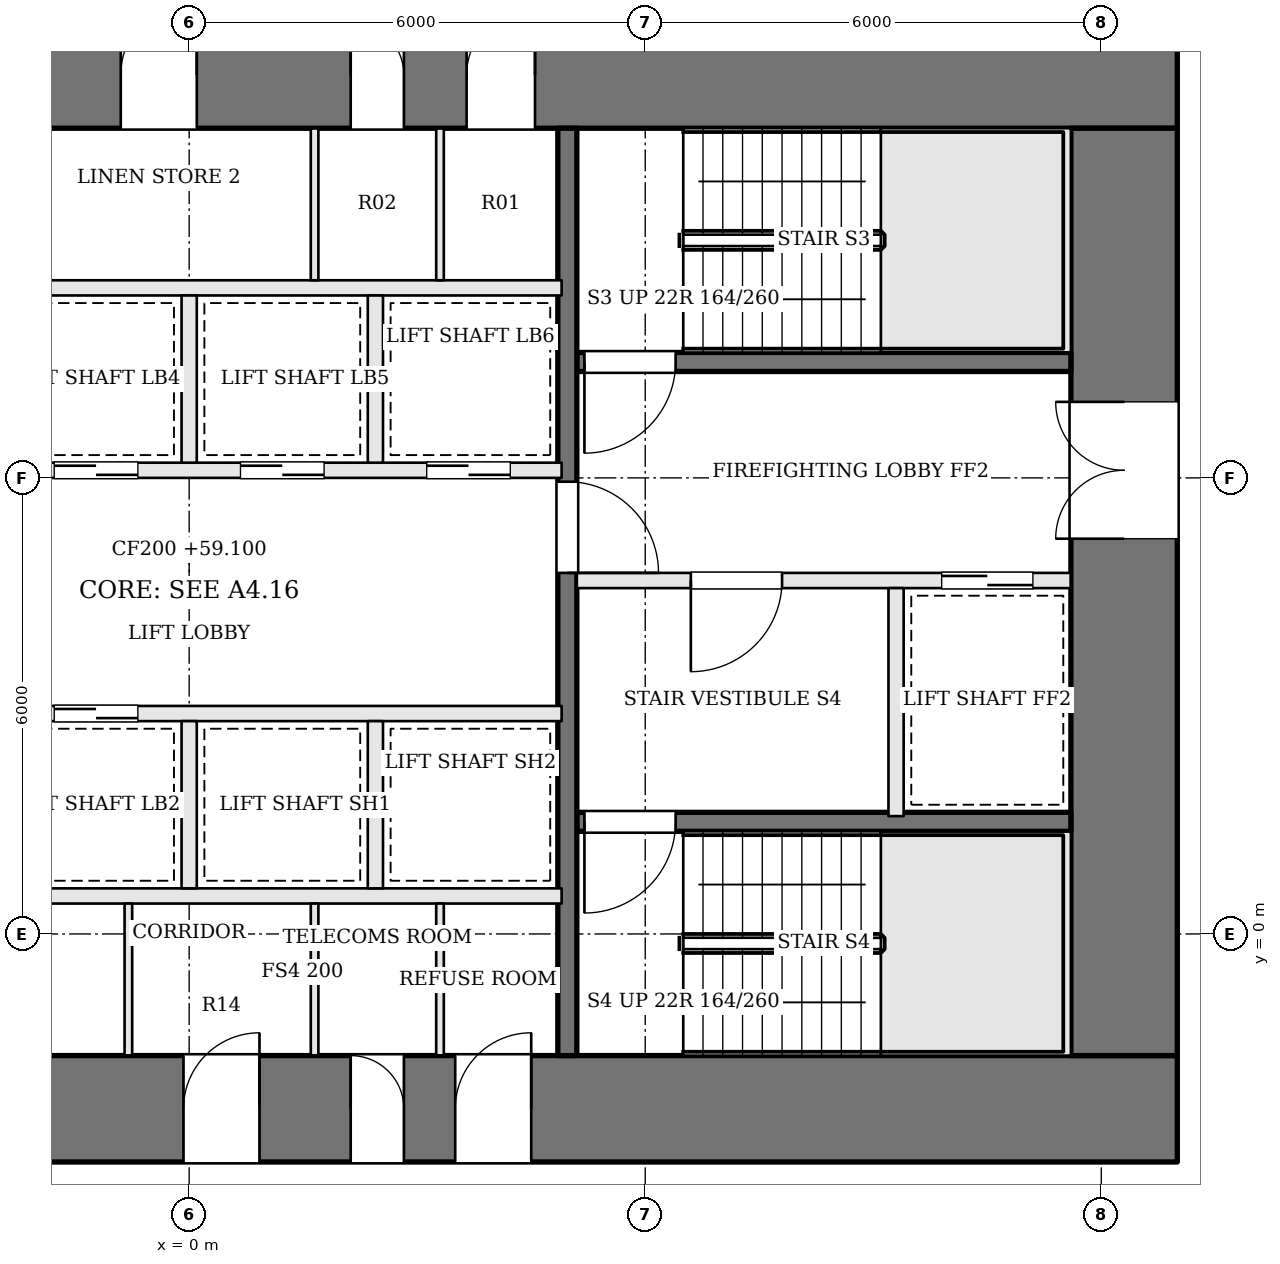
"""IFC4 building model, lengths in metres.
Left out: names, types, materials, properties, quantities, classifications, styles, units other than length and angle.
Written with IfcOpenShell. Run it as: python <this file> out.ifc"""

import sys

from ifc_helpers import new_model, si_unit, direction, frame, frame_2d, origin, place, context, subcontext, project, spatial, rectangle, extrude, element, fill, save


model = new_model("IFC4")
c1 = context("Model", 3, precision=1e-05, world=origin(), true_north=direction((0.0, 1.0)))
c2 = subcontext(c1, "Body", "Model", "MODEL_VIEW")
j1 = project(units=[si_unit("LENGTHUNIT", "METRE"), si_unit("PLANEANGLEUNIT", "RADIAN")], contexts=[c1])
p1 = place(None, origin())
s1 = spatial("IfcSite", under=j1, at=p1, CompositionType="ELEMENT")
p2 = place(p1, origin())
s2 = spatial("IfcBuilding", under=s1, at=p2, CompositionType="ELEMENT")
p3 = place(p2, frame((0.0, 0.0, 59.1)))
s3 = spatial("IfcBuildingStorey", under=s2, at=p3, CompositionType="ELEMENT", Elevation=59.1)
p4 = place(p3, frame((-13.0, 11.3, 0.0), z_axis=(0.0, 0.0, 1.0), x_axis=(1.0, 0.0, 0.0)))
e1 = element("IfcWall", 1, at=p4, inside=s3, PredefinedType="SHEAR", context=c2, shape_type="SweptSolid", body=[
    extrude(rectangle(XDim=26.0, YDim=1.4, at=frame_2d((13.0, 0.0))), origin(), (0.0, 0.0, 1.0), 3.6),
])
p5 = place(p4, frame((8.825, 0.0, 0.0)))
e2 = element("IfcOpeningElement", 2, at=p5, cuts=e1, PredefinedType="OPENING", context=c2, shape_type="SweptSolid", body=[
    extrude(rectangle(XDim=1.0, YDim=2.1, at=frame_2d((0.5, 1.05))), frame((0.0, 0.71, 0.0), z_axis=(0.0, -1.0, 0.0), x_axis=(1.0, 0.0, 0.0)), (0.0, 0.0, 1.0), 1.42),
])
p6 = place(p4, frame((12.1, 0.0, 0.0)))
e3 = element("IfcOpeningElement", 3, at=p6, cuts=e1, PredefinedType="OPENING", context=c2, shape_type="SweptSolid", body=[
    extrude(rectangle(XDim=1.0, YDim=2.1, at=frame_2d((0.5, 1.05))), frame((0.0, 0.71, 0.0), z_axis=(0.0, -1.0, 0.0), x_axis=(1.0, 0.0, 0.0)), (0.0, 0.0, 1.0), 1.42),
])
p7 = place(p4, frame((15.125, 0.0, 0.0)))
e4 = element("IfcOpeningElement", 4, at=p7, cuts=e1, PredefinedType="OPENING", context=c2, shape_type="SweptSolid", body=[
    extrude(rectangle(XDim=0.7, YDim=2.1, at=frame_2d((0.35, 1.05))), frame((0.0, 0.71, 0.0), z_axis=(0.0, -1.0, 0.0), x_axis=(1.0, 0.0, 0.0)), (0.0, 0.0, 1.0), 1.42),
])
p8 = place(p4, frame((16.65, 0.0, 0.0)))
e5 = element("IfcOpeningElement", 5, at=p8, cuts=e1, PredefinedType="OPENING", context=c2, shape_type="SweptSolid", body=[
    extrude(rectangle(XDim=0.9, YDim=2.1, at=frame_2d((0.45, 1.05))), frame((0.0, 0.71, 0.0), z_axis=(0.0, -1.0, 0.0), x_axis=(1.0, 0.0, 0.0)), (0.0, 0.0, 1.0), 1.42),
])
p9 = place(p3, frame((-13.0, -2.3, 0.0), z_axis=(0.0, 0.0, 1.0), x_axis=(1.0, 0.0, 0.0)))
e6 = element("IfcWall", 6, at=p9, inside=s3, PredefinedType="SHEAR", context=c2, shape_type="SweptSolid", body=[
    extrude(rectangle(XDim=26.0, YDim=1.4, at=frame_2d((13.0, 0.0))), origin(), (0.0, 0.0, 1.0), 3.6),
])
p10 = place(p9, frame((9.65, 0.0, 0.0)))
e7 = element("IfcOpeningElement", 7, at=p10, cuts=e6, PredefinedType="OPENING", context=c2, shape_type="SweptSolid", body=[
    extrude(rectangle(XDim=1.0, YDim=2.1, at=frame_2d((0.5, 1.05))), frame((0.0, 0.71, 0.0), z_axis=(0.0, -1.0, 0.0), x_axis=(1.0, 0.0, 0.0)), (0.0, 0.0, 1.0), 1.42),
])
p11 = place(p9, frame((12.925, 0.0, 0.0)))
e8 = element("IfcOpeningElement", 8, at=p11, cuts=e6, PredefinedType="OPENING", context=c2, shape_type="SweptSolid", body=[
    extrude(rectangle(XDim=1.0, YDim=2.1, at=frame_2d((0.5, 1.05))), frame((0.0, 0.71, 0.0), z_axis=(0.0, -1.0, 0.0), x_axis=(1.0, 0.0, 0.0)), (0.0, 0.0, 1.0), 1.42),
])
p12 = place(p9, frame((15.125, 0.0, 0.0)))
e9 = element("IfcOpeningElement", 9, at=p12, cuts=e6, PredefinedType="OPENING", context=c2, shape_type="SweptSolid", body=[
    extrude(rectangle(XDim=0.7, YDim=2.1, at=frame_2d((0.35, 1.05))), frame((0.0, 0.71, 0.0), z_axis=(0.0, -1.0, 0.0), x_axis=(1.0, 0.0, 0.0)), (0.0, 0.0, 1.0), 1.42),
])
p13 = place(p9, frame((16.5, 0.0, 0.0)))
e10 = element("IfcOpeningElement", 10, at=p13, cuts=e6, PredefinedType="OPENING", context=c2, shape_type="SweptSolid", body=[
    extrude(rectangle(XDim=1.0, YDim=2.1, at=frame_2d((0.5, 1.05))), frame((0.0, 0.71, 0.0), z_axis=(0.0, -1.0, 0.0), x_axis=(1.0, 0.0, 0.0)), (0.0, 0.0, 1.0), 1.42),
])
p14 = place(p3, frame((12.3, -1.6, 0.0), z_axis=(0.0, 0.0, 1.0), x_axis=(0.0, 1.0, 0.0)))
e11 = element("IfcWall", 11, at=p14, inside=s3, PredefinedType="SHEAR", context=c2, shape_type="SweptSolid", body=[
    extrude(rectangle(XDim=12.2, YDim=1.4, at=frame_2d((6.1, 0.0))), origin(), (0.0, 0.0, 1.0), 3.6),
])
p15 = place(p14, frame((6.8, 0.0, 0.0)))
e12 = element("IfcOpeningElement", 12, at=p15, cuts=e11, PredefinedType="OPENING", context=c2, shape_type="SweptSolid", body=[
    extrude(rectangle(XDim=1.8, YDim=2.1, at=frame_2d((0.9, 1.05))), frame((0.0, 0.71, 0.0), z_axis=(0.0, -1.0, 0.0), x_axis=(1.0, 0.0, 0.0)), (0.0, 0.0, 1.0), 1.42),
])
p16 = place(p3, frame((11.6, 7.525, 0.0), z_axis=(0.0, 0.0, 1.0), x_axis=(-1.0, 0.0, 0.0)))
e13 = element("IfcWall", 13, at=p16, inside=s3, PredefinedType="SOLIDWALL", context=c2, shape_type="SweptSolid", body=[
    extrude(rectangle(XDim=6.5, YDim=0.25, at=frame_2d((3.25, 0.0))), origin(), (0.0, 0.0, 1.0), 3.4),
])
p17 = place(p16, frame((5.2, 0.0, 0.0)))
e14 = element("IfcOpeningElement", 14, at=p17, cuts=e13, PredefinedType="OPENING", context=c2, shape_type="SweptSolid", body=[
    extrude(rectangle(XDim=1.2, YDim=2.1, at=frame_2d((0.6, 1.05))), frame((0.0, 0.135, 0.0), z_axis=(0.0, -1.0, 0.0), x_axis=(1.0, 0.0, 0.0)), (0.0, 0.0, 1.0), 0.27),
])
p18 = place(p3, frame((11.6, 4.65, 0.0), z_axis=(0.0, 0.0, 1.0), x_axis=(-1.0, 0.0, 0.0)))
e15 = element("IfcWall", 15, at=p18, inside=s3, PredefinedType="SOLIDWALL", context=c2, shape_type="SweptSolid", body=[
    extrude(rectangle(XDim=6.5, YDim=0.2, at=frame_2d((3.25, 0.0))), origin(), (0.0, 0.0, 1.0), 3.4),
])
p19 = place(p18, frame((3.8, 0.0, 0.0)))
e16 = element("IfcOpeningElement", 16, at=p19, cuts=e15, PredefinedType="OPENING", context=c2, shape_type="SweptSolid", body=[
    extrude(rectangle(XDim=1.2, YDim=2.1, at=frame_2d((0.6, 1.05))), frame((0.0, 0.11, 0.0), z_axis=(0.0, -1.0, 0.0), x_axis=(1.0, 0.0, 0.0)), (0.0, 0.0, 1.0), 0.22),
])
p20 = place(p18, frame((0.5, 0.0, 0.0)))
e17 = element("IfcOpeningElement", 17, at=p20, cuts=e15, PredefinedType="OPENING", context=c2, shape_type="SweptSolid", body=[
    extrude(rectangle(XDim=1.2, YDim=2.1, at=frame_2d((0.6, 1.05))), frame((0.0, 0.11, 0.0), z_axis=(0.0, -1.0, 0.0), x_axis=(1.0, 0.0, 0.0)), (0.0, 0.0, 1.0), 0.22),
])
p21 = place(p3, frame((11.6, 1.475, 0.0), z_axis=(0.0, 0.0, 1.0), x_axis=(-1.0, 0.0, 0.0)))
e18 = element("IfcWall", 18, at=p21, inside=s3, PredefinedType="SOLIDWALL", context=c2, shape_type="SweptSolid", body=[
    extrude(rectangle(XDim=6.5, YDim=0.25, at=frame_2d((3.25, 0.0))), origin(), (0.0, 0.0, 1.0), 3.4),
])
p22 = place(p21, frame((5.2, 0.0, 0.0)))
e19 = element("IfcOpeningElement", 19, at=p22, cuts=e18, PredefinedType="OPENING", context=c2, shape_type="SweptSolid", body=[
    extrude(rectangle(XDim=1.2, YDim=2.1, at=frame_2d((0.6, 1.05))), frame((0.0, 0.135, 0.0), z_axis=(0.0, -1.0, 0.0), x_axis=(1.0, 0.0, 0.0)), (0.0, 0.0, 1.0), 0.27),
])
p23 = place(p3, frame((9.3, 4.55, 0.0), z_axis=(0.0, 0.0, 1.0), x_axis=(0.0, -1.0, 0.0)))
e20 = element("IfcWall", 20, at=p23, inside=s3, PredefinedType="SOLIDWALL", context=c2, shape_type="SweptSolid", body=[
    extrude(rectangle(XDim=3.0, YDim=0.2, at=frame_2d((1.5, 0.0))), origin(), (0.0, 0.0, 1.0), 3.4),
])
p24 = place(p3, frame((4.975, 10.6, 0.0), z_axis=(0.0, 0.0, 1.0), x_axis=(0.0, -1.0, 0.0)))
e21 = element("IfcWall", 21, at=p24, inside=s3, PredefinedType="SOLIDWALL", context=c2, shape_type="SweptSolid", body=[
    extrude(rectangle(XDim=12.2, YDim=0.25, at=frame_2d((6.1, 0.0))), origin(), (0.0, 0.0, 1.0), 3.4),
])
p25 = place(p24, frame((4.65, 0.0, 0.0)))
e22 = element("IfcOpeningElement", 22, at=p25, cuts=e21, PredefinedType="OPENING", context=c2, shape_type="SweptSolid", body=[
    extrude(rectangle(XDim=1.2, YDim=2.1, at=frame_2d((0.6, 1.05))), frame((0.0, 0.135, 0.0), z_axis=(0.0, -1.0, 0.0), x_axis=(1.0, 0.0, 0.0)), (0.0, 0.0, 1.0), 0.27),
])
p26 = place(p3, frame((-4.9, 0.5, 0.0), z_axis=(0.0, 0.0, 1.0), x_axis=(1.0, 0.0, 0.0)))
e23 = element("IfcWall", 23, at=p26, inside=s3, PredefinedType="SOLIDWALL", context=c2, shape_type="SweptSolid", body=[
    extrude(rectangle(XDim=9.8, YDim=0.2, at=frame_2d((4.9, 0.0))), origin(), (0.0, 0.0, 1.0), 3.4),
])
p27 = place(p3, frame((-4.9, 2.9, 0.0), z_axis=(0.0, 0.0, 1.0), x_axis=(1.0, 0.0, 0.0)))
e24 = element("IfcWall", 24, at=p27, inside=s3, PredefinedType="SOLIDWALL", context=c2, shape_type="SweptSolid", body=[
    extrude(rectangle(XDim=9.8, YDim=0.2, at=frame_2d((4.9, 0.0))), origin(), (0.0, 0.0, 1.0), 3.4),
])
p28 = place(p27, frame((0.675, 0.0, 0.0)))
e25 = element("IfcOpeningElement", 25, at=p28, cuts=e24, PredefinedType="OPENING", context=c2, shape_type="SweptSolid", body=[
    extrude(rectangle(XDim=1.1, YDim=2.1, at=frame_2d((0.55, 1.05))), frame((0.0, 0.11, 0.0), z_axis=(0.0, -1.0, 0.0), x_axis=(1.0, 0.0, 0.0)), (0.0, 0.0, 1.0), 0.22),
])
p29 = place(p27, frame((3.125, 0.0, 0.0)))
e26 = element("IfcOpeningElement", 26, at=p29, cuts=e24, PredefinedType="OPENING", context=c2, shape_type="SweptSolid", body=[
    extrude(rectangle(XDim=1.1, YDim=2.1, at=frame_2d((0.55, 1.05))), frame((0.0, 0.11, 0.0), z_axis=(0.0, -1.0, 0.0), x_axis=(1.0, 0.0, 0.0)), (0.0, 0.0, 1.0), 0.22),
])
p30 = place(p3, frame((-4.9, 6.1, 0.0), z_axis=(0.0, 0.0, 1.0), x_axis=(1.0, 0.0, 0.0)))
e27 = element("IfcWall", 27, at=p30, inside=s3, PredefinedType="SOLIDWALL", context=c2, shape_type="SweptSolid", body=[
    extrude(rectangle(XDim=9.8, YDim=0.2, at=frame_2d((4.9, 0.0))), origin(), (0.0, 0.0, 1.0), 3.4),
])
p31 = place(p30, frame((0.675, 0.0, 0.0)))
e28 = element("IfcOpeningElement", 28, at=p31, cuts=e27, PredefinedType="OPENING", context=c2, shape_type="SweptSolid", body=[
    extrude(rectangle(XDim=1.1, YDim=2.1, at=frame_2d((0.55, 1.05))), frame((0.0, 0.11, 0.0), z_axis=(0.0, -1.0, 0.0), x_axis=(1.0, 0.0, 0.0)), (0.0, 0.0, 1.0), 0.22),
])
p32 = place(p30, frame((3.125, 0.0, 0.0)))
e29 = element("IfcOpeningElement", 29, at=p32, cuts=e27, PredefinedType="OPENING", context=c2, shape_type="SweptSolid", body=[
    extrude(rectangle(XDim=1.1, YDim=2.1, at=frame_2d((0.55, 1.05))), frame((0.0, 0.11, 0.0), z_axis=(0.0, -1.0, 0.0), x_axis=(1.0, 0.0, 0.0)), (0.0, 0.0, 1.0), 0.22),
])
p33 = place(p30, frame((5.575, 0.0, 0.0)))
e30 = element("IfcOpeningElement", 30, at=p33, cuts=e27, PredefinedType="OPENING", context=c2, shape_type="SweptSolid", body=[
    extrude(rectangle(XDim=1.1, YDim=2.1, at=frame_2d((0.55, 1.05))), frame((0.0, 0.11, 0.0), z_axis=(0.0, -1.0, 0.0), x_axis=(1.0, 0.0, 0.0)), (0.0, 0.0, 1.0), 0.22),
])
p34 = place(p30, frame((8.025, 0.0, 0.0)))
e31 = element("IfcOpeningElement", 31, at=p34, cuts=e27, PredefinedType="OPENING", context=c2, shape_type="SweptSolid", body=[
    extrude(rectangle(XDim=1.1, YDim=2.1, at=frame_2d((0.55, 1.05))), frame((0.0, 0.11, 0.0), z_axis=(0.0, -1.0, 0.0), x_axis=(1.0, 0.0, 0.0)), (0.0, 0.0, 1.0), 0.22),
])
p35 = place(p3, frame((-4.9, 8.5, 0.0), z_axis=(0.0, 0.0, 1.0), x_axis=(1.0, 0.0, 0.0)))
e32 = element("IfcWall", 32, at=p35, inside=s3, PredefinedType="SOLIDWALL", context=c2, shape_type="SweptSolid", body=[
    extrude(rectangle(XDim=9.8, YDim=0.2, at=frame_2d((4.9, 0.0))), origin(), (0.0, 0.0, 1.0), 3.4),
])
for number, where, z_axis, x_axis in (
    (33, (0.0, 0.6, 0.0), (0.0, 0.0, 1.0), (0.0, 1.0, 0.0)),
    (34, (2.45, 0.6, 0.0), (0.0, 0.0, 1.0), (0.0, 1.0, 0.0)),
    (35, (0.0, 6.2, 0.0), (0.0, 0.0, 1.0), (0.0, 1.0, 0.0)),
    (36, (2.45, 6.2, 0.0), (0.0, 0.0, 1.0), (0.0, 1.0, 0.0)),
):
    element("IfcWall", number, at=place(p3, frame(where, z_axis=z_axis, x_axis=x_axis)), inside=s3, PredefinedType="SOLIDWALL", context=c2, shape_type="SweptSolid", body=[
        extrude(rectangle(XDim=2.2, YDim=0.2, at=frame_2d((1.1, 0.0))), origin(), (0.0, 0.0, 1.0), 3.4),
    ])
for number, where, z_axis, x_axis in (
    (37, (-0.8, -1.6, 0.0), (0.0, 0.0, 1.0), (0.0, 1.0, 0.0)),
    (38, (1.65, -1.6, 0.0), (0.0, 0.0, 1.0), (0.0, 1.0, 0.0)),
    (39, (3.3, -1.6, 0.0), (0.0, 0.0, 1.0), (0.0, 1.0, 0.0)),
    (40, (1.65, 8.6, 0.0), (0.0, 0.0, 1.0), (0.0, 1.0, 0.0)),
    (41, (3.3, 8.6, 0.0), (0.0, 0.0, 1.0), (0.0, 1.0, 0.0)),
):
    element("IfcWall", number, at=place(p3, frame(where, z_axis=z_axis, x_axis=x_axis)), inside=s3, PredefinedType="PARTITIONING", context=c2, shape_type="SweptSolid", body=[
        extrude(rectangle(XDim=2.0, YDim=0.1, at=frame_2d((1.0, 0.0))), origin(), (0.0, 0.0, 1.0), 3.4),
    ])
p36 = place(p15, origin())
e42 = element("IfcDoor", 42, at=p36, inside=s3, OperationType="DOUBLE_DOOR_SINGLE_SWING", PredefinedType="DOOR", context=c2, shape_type="SweptSolid", body=[
    extrude(rectangle(XDim=1.8, YDim=2.1, at=frame_2d((0.9, 1.05))), frame((0.0, 0.025, 0.0), z_axis=(0.0, -1.0, 0.0), x_axis=(1.0, 0.0, 0.0)), (0.0, 0.0, 1.0), 0.05),
])
fill(e12, e42)
p37 = place(p25, origin())
e43 = element("IfcDoor", 43, at=p37, inside=s3, OperationType="SINGLE_SWING_RIGHT", PredefinedType="DOOR", context=c2, shape_type="SweptSolid", body=[
    extrude(rectangle(XDim=1.2, YDim=2.1, at=frame_2d((0.6, 1.05))), frame((0.0, 0.025, 0.0), z_axis=(0.0, -1.0, 0.0), x_axis=(1.0, 0.0, 0.0)), (0.0, 0.0, 1.0), 0.05),
])
fill(e22, e43)
p38 = place(p19, origin())
e44 = element("IfcDoor", 44, at=p38, inside=s3, OperationType="SINGLE_SWING_RIGHT", PredefinedType="DOOR", context=c2, shape_type="SweptSolid", body=[
    extrude(rectangle(XDim=1.2, YDim=2.1, at=frame_2d((0.6, 1.05))), frame((0.0, 0.025, 0.0), z_axis=(0.0, -1.0, 0.0), x_axis=(1.0, 0.0, 0.0)), (0.0, 0.0, 1.0), 0.05),
])
fill(e16, e44)
p39 = place(p17, origin())
e45 = element("IfcDoor", 45, at=p39, inside=s3, OperationType="SINGLE_SWING_RIGHT", PredefinedType="DOOR", context=c2, shape_type="SweptSolid", body=[
    extrude(rectangle(XDim=1.2, YDim=2.1, at=frame_2d((0.6, 1.05))), frame((0.0, 0.025, 0.0), z_axis=(0.0, -1.0, 0.0), x_axis=(1.0, 0.0, 0.0)), (0.0, 0.0, 1.0), 0.05),
])
fill(e14, e45)
p40 = place(p22, origin())
e46 = element("IfcDoor", 46, at=p40, inside=s3, OperationType="SINGLE_SWING_RIGHT", PredefinedType="DOOR", context=c2, shape_type="SweptSolid", body=[
    extrude(rectangle(XDim=1.2, YDim=2.1, at=frame_2d((0.6, 1.05))), frame((0.0, 0.025, 0.0), z_axis=(0.0, -1.0, 0.0), x_axis=(1.0, 0.0, 0.0)), (0.0, 0.0, 1.0), 0.05),
])
fill(e19, e46)
p41 = place(p20, origin())
e47 = element("IfcDoor", 47, at=p41, inside=s3, OperationType="SLIDING_TO_RIGHT", PredefinedType="DOOR", context=c2, shape_type="SweptSolid", body=[
    extrude(rectangle(XDim=1.2, YDim=2.1, at=frame_2d((0.6, 1.05))), frame((0.0, 0.025, 0.0), z_axis=(0.0, -1.0, 0.0), x_axis=(1.0, 0.0, 0.0)), (0.0, 0.0, 1.0), 0.05),
])
fill(e17, e47)
p42 = place(p29, origin())
e48 = element("IfcDoor", 48, at=p42, inside=s3, OperationType="SLIDING_TO_LEFT", PredefinedType="DOOR", context=c2, shape_type="SweptSolid", body=[
    extrude(rectangle(XDim=1.1, YDim=2.1, at=frame_2d((0.55, 1.05))), frame((0.0, 0.025, 0.0), z_axis=(0.0, -1.0, 0.0), x_axis=(1.0, 0.0, 0.0)), (0.0, 0.0, 1.0), 0.05),
])
fill(e26, e48)
p43 = place(p32, origin())
e49 = element("IfcDoor", 49, at=p43, inside=s3, OperationType="SLIDING_TO_LEFT", PredefinedType="DOOR", context=c2, shape_type="SweptSolid", body=[
    extrude(rectangle(XDim=1.1, YDim=2.1, at=frame_2d((0.55, 1.05))), frame((0.0, 0.025, 0.0), z_axis=(0.0, -1.0, 0.0), x_axis=(1.0, 0.0, 0.0)), (0.0, 0.0, 1.0), 0.05),
])
fill(e29, e49)
p44 = place(p33, origin())
e50 = element("IfcDoor", 50, at=p44, inside=s3, OperationType="SLIDING_TO_RIGHT", PredefinedType="DOOR", context=c2, shape_type="SweptSolid", body=[
    extrude(rectangle(XDim=1.1, YDim=2.1, at=frame_2d((0.55, 1.05))), frame((0.0, 0.025, 0.0), z_axis=(0.0, -1.0, 0.0), x_axis=(1.0, 0.0, 0.0)), (0.0, 0.0, 1.0), 0.05),
])
fill(e30, e50)
p45 = place(p34, origin())
e51 = element("IfcDoor", 51, at=p45, inside=s3, OperationType="SLIDING_TO_LEFT", PredefinedType="DOOR", context=c2, shape_type="SweptSolid", body=[
    extrude(rectangle(XDim=1.1, YDim=2.1, at=frame_2d((0.55, 1.05))), frame((0.0, 0.025, 0.0), z_axis=(0.0, -1.0, 0.0), x_axis=(1.0, 0.0, 0.0)), (0.0, 0.0, 1.0), 0.05),
])
fill(e31, e51)
p46 = place(p11, origin())
e52 = element("IfcDoor", 52, at=p46, inside=s3, OperationType="SINGLE_SWING_RIGHT", PredefinedType="DOOR", context=c2, shape_type="SweptSolid", body=[
    extrude(rectangle(XDim=1.0, YDim=2.1, at=frame_2d((0.5, 1.05))), frame((0.0, 0.025, 0.0), z_axis=(0.0, -1.0, 0.0), x_axis=(1.0, 0.0, 0.0)), (0.0, 0.0, 1.0), 0.05),
])
fill(e8, e52)
p47 = place(p12, origin())
e53 = element("IfcDoor", 53, at=p47, inside=s3, OperationType="SINGLE_SWING_LEFT", PredefinedType="DOOR", context=c2, shape_type="SweptSolid", body=[
    extrude(rectangle(XDim=0.7, YDim=2.1, at=frame_2d((0.35, 1.05))), frame((0.0, 0.025, 0.0), z_axis=(0.0, -1.0, 0.0), x_axis=(1.0, 0.0, 0.0)), (0.0, 0.0, 1.0), 0.05),
])
fill(e9, e53)
p48 = place(p13, origin())
e54 = element("IfcDoor", 54, at=p48, inside=s3, OperationType="SINGLE_SWING_RIGHT", PredefinedType="DOOR", context=c2, shape_type="SweptSolid", body=[
    extrude(rectangle(XDim=1.0, YDim=2.1, at=frame_2d((0.5, 1.05))), frame((0.0, 0.025, 0.0), z_axis=(0.0, -1.0, 0.0), x_axis=(1.0, 0.0, 0.0)), (0.0, 0.0, 1.0), 0.05),
])
fill(e10, e54)
p49 = place(p6, origin())
e55 = element("IfcDoor", 55, at=p49, inside=s3, OperationType="SINGLE_SWING_RIGHT", PredefinedType="DOOR", context=c2, shape_type="SweptSolid", body=[
    extrude(rectangle(XDim=1.0, YDim=2.1, at=frame_2d((0.5, 1.05))), frame((0.0, 0.025, 0.0), z_axis=(0.0, -1.0, 0.0), x_axis=(1.0, 0.0, 0.0)), (0.0, 0.0, 1.0), 0.05),
])
fill(e3, e55)
p50 = place(p7, origin())
e56 = element("IfcDoor", 56, at=p50, inside=s3, OperationType="SINGLE_SWING_LEFT", PredefinedType="DOOR", context=c2, shape_type="SweptSolid", body=[
    extrude(rectangle(XDim=0.7, YDim=2.1, at=frame_2d((0.35, 1.05))), frame((0.0, 0.025, 0.0), z_axis=(0.0, -1.0, 0.0), x_axis=(1.0, 0.0, 0.0)), (0.0, 0.0, 1.0), 0.05),
])
fill(e4, e56)
p51 = place(p8, origin())
e57 = element("IfcDoor", 57, at=p51, inside=s3, OperationType="SINGLE_SWING_RIGHT", PredefinedType="DOOR", context=c2, shape_type="SweptSolid", body=[
    extrude(rectangle(XDim=0.9, YDim=2.1, at=frame_2d((0.45, 1.05))), frame((0.0, 0.025, 0.0), z_axis=(0.0, -1.0, 0.0), x_axis=(1.0, 0.0, 0.0)), (0.0, 0.0, 1.0), 0.05),
])
fill(e5, e57)
save(model, sys.argv[1])
